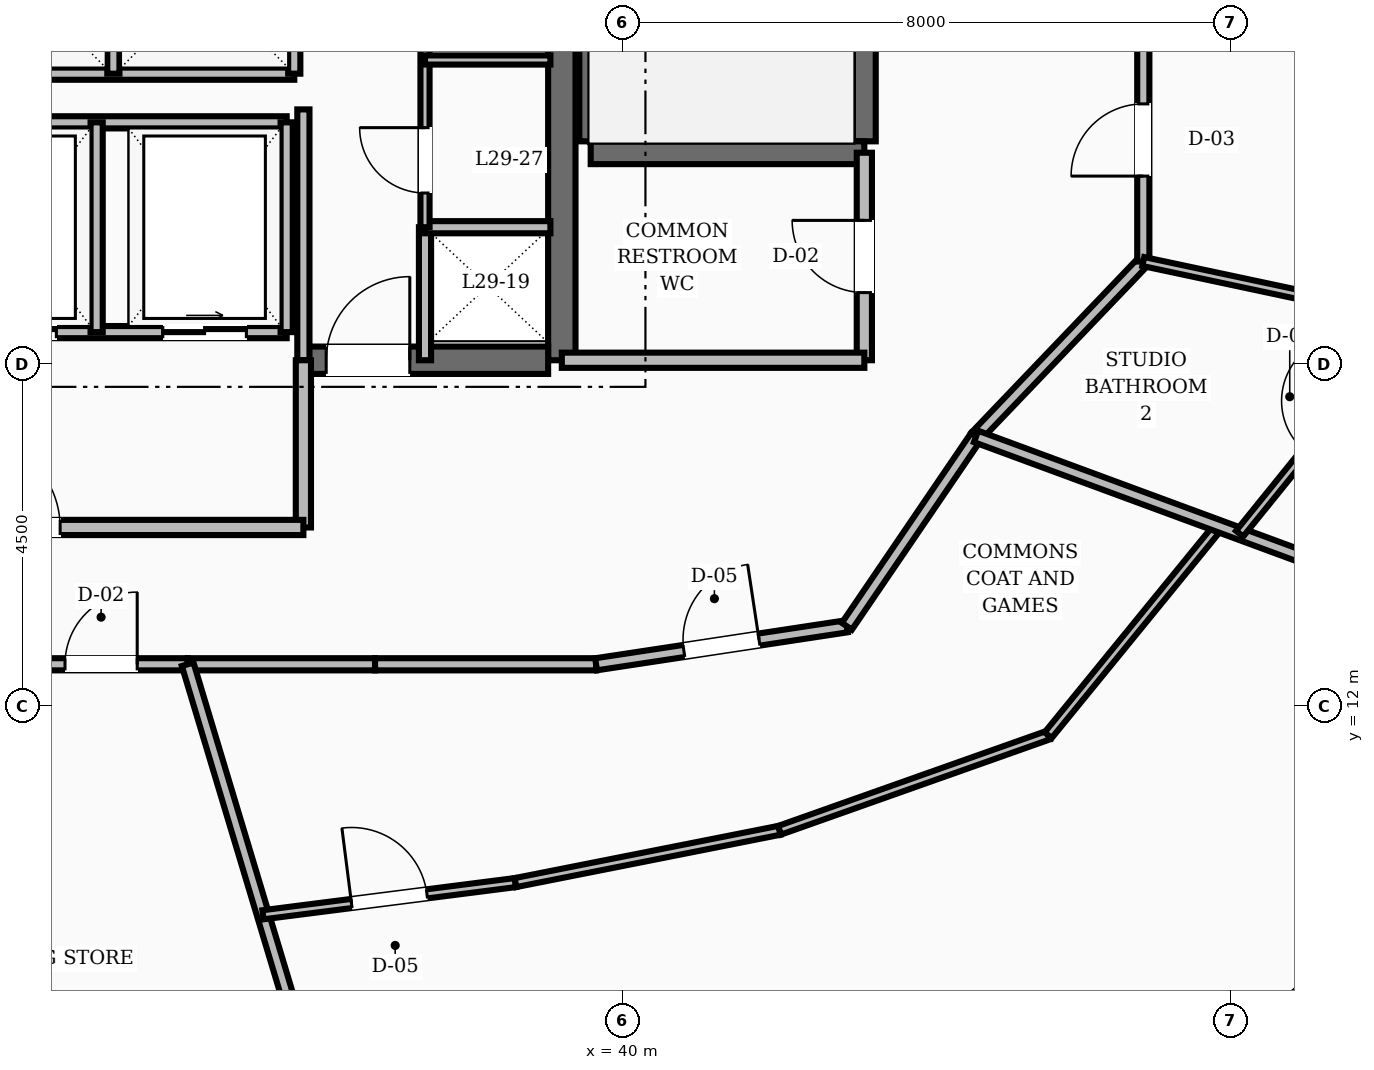
"""IFC4 building model, lengths in metres.
Left out: names, types, materials, properties, quantities, classifications, styles, units other than length and angle.
Written with IfcOpenShell. Run it as: python <this file> out.ifc"""

import sys

from ifc_helpers import new_model, si_unit, direction, frame, frame_2d, origin, place, context, subcontext, project, spatial, rectangle, extrude, element, fill, save


model = new_model("IFC4")
c1 = context("Model", 3, precision=1e-05, world=origin(), true_north=direction((0.0, 1.0)))
c2 = subcontext(c1, "Body", "Model", "MODEL_VIEW")
j1 = project(units=[si_unit("LENGTHUNIT", "METRE"), si_unit("PLANEANGLEUNIT", "RADIAN")], contexts=[c1])
p1 = place(None, origin())
s1 = spatial("IfcSite", under=j1, at=p1, CompositionType="ELEMENT")
p2 = place(p1, origin())
s2 = spatial("IfcBuilding", under=s1, at=p2, CompositionType="ELEMENT")
p3 = place(p2, frame((0.0, 0.0, 117.2)))
s3 = spatial("IfcBuildingStorey", under=s2, at=p3, CompositionType="ELEMENT", Elevation=117.2)
p4 = place(p3, frame((39.2, 16.55, 0.0), z_axis=(0.0, 0.0, 1.0), x_axis=(0.0, 1.0, 0.0)))
e1 = element("IfcWall", 1, at=p4, inside=s3, PredefinedType="SHEAR", context=c2, shape_type="SweptSolid", body=[
    extrude(rectangle(XDim=6.3, YDim=0.36, at=frame_2d((3.15, 0.0))), origin(), (0.0, 0.0, 1.0), 3.6),
])
p5 = place(p3, frame((35.8, 16.55, 0.0), z_axis=(0.0, 0.0, 1.0), x_axis=(1.0, 0.0, 0.0)))
e2 = element("IfcWall", 2, at=p5, inside=s3, PredefinedType="SHEAR", context=c2, shape_type="SweptSolid", body=[
    extrude(rectangle(XDim=3.22, YDim=0.36, at=frame_2d((1.61, 0.0))), origin(), (0.0, 0.0, 1.0), 3.6),
])
p6 = place(p5, frame((0.3, 0.0, 0.0)))
e3 = element("IfcOpeningElement", 3, at=p6, cuts=e2, PredefinedType="OPENING", context=c2, shape_type="SweptSolid", body=[
    extrude(rectangle(XDim=1.1, YDim=2.1, at=frame_2d((0.55, 1.05))), frame((0.0, 0.19, 0.0), z_axis=(0.0, -1.0, 0.0), x_axis=(1.0, 0.0, 0.0)), (0.0, 0.0, 1.0), 0.38),
])
for number, where, z_axis, x_axis in (
    (4, (43.18, 19.43, 0.0), (0.0, 0.0, 1.0), (0.0, 1.0, 0.0)),
    (5, (39.58, 19.43, 0.0), (0.0, 0.0, 1.0), (0.0, 1.0, 0.0)),
):
    element("IfcWall", number, at=place(p3, frame(where, z_axis=z_axis, x_axis=x_axis)), inside=s3, PredefinedType="SHEAR", context=c2, shape_type="SweptSolid", body=[
        extrude(rectangle(XDim=8.74, YDim=0.3, at=frame_2d((4.37, 0.0))), origin(), (0.0, 0.0, 1.0), 3.6),
    ])
p7 = place(p3, frame((39.58, 19.28, 0.0), z_axis=(0.0, 0.0, 1.0), x_axis=(1.0, 0.0, 0.0)))
e6 = element("IfcWall", 6, at=p7, inside=s3, PredefinedType="SHEAR", context=c2, shape_type="SweptSolid", body=[
    extrude(rectangle(XDim=3.6, YDim=0.3, at=frame_2d((1.8, 0.0))), origin(), (0.0, 0.0, 1.0), 3.6),
])
p8 = place(p3, frame((43.18, 16.55, 0.0), z_axis=(0.0, 0.0, 1.0), x_axis=(0.0, 1.0, 0.0)))
e7 = element("IfcWall", 7, at=p8, inside=s3, PredefinedType="SOLIDWALL", context=c2, shape_type="SweptSolid", body=[
    extrude(rectangle(XDim=2.73, YDim=0.2, at=frame_2d((1.365, 0.0))), origin(), (0.0, 0.0, 1.0), 2.8),
])
p9 = place(p8, frame((0.89, 0.0, 0.0)))
e8 = element("IfcOpeningElement", 8, at=p9, cuts=e7, PredefinedType="OPENING", context=c2, shape_type="SweptSolid", body=[
    extrude(rectangle(XDim=0.95, YDim=2.1, at=frame_2d((0.475, 1.05))), frame((0.0, 0.11, 0.0), z_axis=(0.0, -1.0, 0.0), x_axis=(1.0, 0.0, 0.0)), (0.0, 0.0, 1.0), 0.22),
])
p10 = place(p3, frame((39.2, 16.55, 0.0), z_axis=(0.0, 0.0, 1.0), x_axis=(1.0, 0.0, 0.0)))
e9 = element("IfcWall", 9, at=p10, inside=s3, PredefinedType="SOLIDWALL", context=c2, shape_type="SweptSolid", body=[
    extrude(rectangle(XDim=3.98, YDim=0.2, at=frame_2d((1.99, 0.0))), origin(), (0.0, 0.0, 1.0), 2.8),
])
p11 = place(p3, frame((35.8, 16.55, 0.0), z_axis=(0.0, 0.0, 1.0), x_axis=(0.0, 1.0, 0.0)))
e10 = element("IfcWall", 10, at=p11, inside=s3, PredefinedType="SOLIDWALL", context=c2, shape_type="SweptSolid", body=[
    extrude(rectangle(XDim=3.3, YDim=0.16, at=frame_2d((1.65, 0.0))), origin(), (0.0, 0.0, 1.0), 2.8),
])
p12 = place(p3, frame((37.4, 16.55, 0.0), z_axis=(0.0, 0.0, 1.0), x_axis=(0.0, 1.0, 0.0)))
e11 = element("IfcWall", 11, at=p12, inside=s3, PredefinedType="SOLIDWALL", context=c2, shape_type="SweptSolid", body=[
    extrude(rectangle(XDim=1.75, YDim=0.16, at=frame_2d((0.875, 0.0))), origin(), (0.0, 0.0, 1.0), 2.8),
])
p13 = place(p3, frame((35.8, 14.35, 0.0), z_axis=(0.0, 0.0, 1.0), x_axis=(0.0, 1.0, 0.0)))
e12 = element("IfcWall", 12, at=p13, inside=s3, PredefinedType="SOLIDWALL", context=c2, shape_type="SweptSolid", body=[
    extrude(rectangle(XDim=2.2, YDim=0.2, at=frame_2d((1.1, 0.0))), origin(), (0.0, 0.0, 1.0), 2.8),
])
p14 = place(p3, frame((28.2, 14.35, 0.0), z_axis=(0.0, 0.0, 1.0), x_axis=(1.0, 0.0, 0.0)))
e13 = element("IfcWall", 13, at=p14, inside=s3, PredefinedType="SOLIDWALL", context=c2, shape_type="SweptSolid", body=[
    extrude(rectangle(XDim=7.6, YDim=0.2, at=frame_2d((3.8, 0.0))), origin(), (0.0, 0.0, 1.0), 2.8),
])
p15 = place(p14, frame((3.2, 0.0, 0.0)))
e14 = element("IfcOpeningElement", 14, at=p15, cuts=e13, PredefinedType="OPENING", context=c2, shape_type="SweptSolid", body=[
    extrude(rectangle(XDim=1.2, YDim=2.1, at=frame_2d((0.6, 1.05))), frame((0.0, 0.11, 0.0), z_axis=(0.0, -1.0, 0.0), x_axis=(1.0, 0.0, 0.0)), (0.0, 0.0, 1.0), 0.22),
])
p16 = place(p3, frame((30.92, 20.32, 0.0), z_axis=(0.0, 0.0, 1.0), x_axis=(1.0, 0.0, 0.0)))
e15 = element("IfcWall", 15, at=p16, inside=s3, PredefinedType="SOLIDWALL", context=c2, shape_type="SweptSolid", body=[
    extrude(rectangle(XDim=4.76, YDim=0.16, at=frame_2d((2.38, 0.0))), origin(), (0.0, 0.0, 1.0), 2.8),
])
for number, where, z_axis, x_axis in (
    (16, (33.3, 20.32, 0.0), (0.0, 0.0, 1.0), (0.0, 1.0, 0.0)),
    (17, (35.68, 20.32, 0.0), (0.0, 0.0, 1.0), (0.0, 1.0, 0.0)),
):
    element("IfcWall", number, at=place(p3, frame(where, z_axis=z_axis, x_axis=x_axis)), inside=s3, PredefinedType="SOLIDWALL", context=c2, shape_type="SweptSolid", body=[
        extrude(rectangle(XDim=2.36, YDim=0.16, at=frame_2d((1.18, 0.0))), origin(), (0.0, 0.0, 1.0), 2.8),
    ])
p17 = place(p3, frame((28.42, 16.92, 0.0), z_axis=(0.0, 0.0, 1.0), x_axis=(1.0, 0.0, 0.0)))
e18 = element("IfcWall", 18, at=p17, inside=s3, PredefinedType="SOLIDWALL", context=c2, shape_type="SweptSolid", body=[
    extrude(rectangle(XDim=7.16, YDim=0.16, at=frame_2d((3.58, 0.0))), origin(), (0.0, 0.0, 1.0), 2.8),
])
p18 = place(p17, frame((0.53, 0.0, 0.0)))
e19 = element("IfcOpeningElement", 19, at=p18, cuts=e18, PredefinedType="OPENING", context=c2, shape_type="SweptSolid", body=[
    extrude(rectangle(XDim=1.1, YDim=2.15, at=frame_2d((0.55, 1.075))), frame((0.0, 0.09, 0.0), z_axis=(0.0, -1.0, 0.0), x_axis=(1.0, 0.0, 0.0)), (0.0, 0.0, 1.0), 0.18),
])
p19 = place(p17, frame((3.03, 0.0, 0.0)))
e20 = element("IfcOpeningElement", 20, at=p19, cuts=e18, PredefinedType="OPENING", context=c2, shape_type="SweptSolid", body=[
    extrude(rectangle(XDim=1.1, YDim=2.15, at=frame_2d((0.55, 1.075))), frame((0.0, 0.09, 0.0), z_axis=(0.0, -1.0, 0.0), x_axis=(1.0, 0.0, 0.0)), (0.0, 0.0, 1.0), 0.18),
])
p20 = place(p17, frame((5.53, 0.0, 0.0)))
e21 = element("IfcOpeningElement", 21, at=p20, cuts=e18, PredefinedType="OPENING", context=c2, shape_type="SweptSolid", body=[
    extrude(rectangle(XDim=1.1, YDim=2.15, at=frame_2d((0.55, 1.075))), frame((0.0, 0.09, 0.0), z_axis=(0.0, -1.0, 0.0), x_axis=(1.0, 0.0, 0.0)), (0.0, 0.0, 1.0), 0.18),
])
p21 = place(p3, frame((28.42, 19.68, 0.0), z_axis=(0.0, 0.0, 1.0), x_axis=(1.0, 0.0, 0.0)))
e22 = element("IfcWall", 22, at=p21, inside=s3, PredefinedType="SOLIDWALL", context=c2, shape_type="SweptSolid", body=[
    extrude(rectangle(XDim=7.16, YDim=0.16, at=frame_2d((3.58, 0.0))), origin(), (0.0, 0.0, 1.0), 2.8),
])
for number, where, z_axis, x_axis in (
    (23, (33.08, 16.92, 0.0), (0.0, 0.0, 1.0), (0.0, 1.0, 0.0)),
    (24, (35.58, 16.92, 0.0), (0.0, 0.0, 1.0), (0.0, 1.0, 0.0)),
):
    element("IfcWall", number, at=place(p3, frame(where, z_axis=z_axis, x_axis=x_axis)), inside=s3, PredefinedType="SOLIDWALL", context=c2, shape_type="SweptSolid", body=[
        extrude(rectangle(XDim=2.76, YDim=0.16, at=frame_2d((1.38, 0.0))), origin(), (0.0, 0.0, 1.0), 2.8),
    ])
p22 = place(p3, frame((37.4, 18.3, 0.0), z_axis=(0.0, 0.0, 1.0), x_axis=(1.0, 0.0, 0.0)))
e25 = element("IfcWall", 25, at=p22, inside=s3, PredefinedType="SOLIDWALL", context=c2, shape_type="SweptSolid", body=[
    extrude(rectangle(XDim=1.65, YDim=0.16, at=frame_2d((0.825, 0.0))), origin(), (0.0, 0.0, 1.0), 2.8),
])
p23 = place(p3, frame((37.4, 18.3, 0.0), z_axis=(0.0, 0.0, 1.0), x_axis=(0.0, 1.0, 0.0)))
e26 = element("IfcWall", 26, at=p23, inside=s3, PredefinedType="PARTITIONING", context=c2, shape_type="SweptSolid", body=[
    extrude(rectangle(XDim=4.45, YDim=0.12, at=frame_2d((2.225, 0.0))), origin(), (0.0, 0.0, 1.0), 2.8),
])
p24 = place(p23, frame((0.45, 0.0, 0.0)))
e27 = element("IfcOpeningElement", 27, at=p24, cuts=e26, PredefinedType="OPENING", context=c2, shape_type="SweptSolid", body=[
    extrude(rectangle(XDim=0.86, YDim=2.1, at=frame_2d((0.43, 1.05))), frame((0.0, 0.07, 0.0), z_axis=(0.0, -1.0, 0.0), x_axis=(1.0, 0.0, 0.0)), (0.0, 0.0, 1.0), 0.14),
])
p25 = place(p23, frame((2.65, 0.0, 0.0)))
e28 = element("IfcOpeningElement", 28, at=p25, cuts=e26, PredefinedType="OPENING", context=c2, shape_type="SweptSolid", body=[
    extrude(rectangle(XDim=0.86, YDim=2.1, at=frame_2d((0.43, 1.05))), frame((0.0, 0.07, 0.0), z_axis=(0.0, -1.0, 0.0), x_axis=(1.0, 0.0, 0.0)), (0.0, 0.0, 1.0), 0.14),
])
p26 = place(p3, frame((37.4, 20.5, 0.0), z_axis=(0.0, 0.0, 1.0), x_axis=(1.0, 0.0, 0.0)))
e29 = element("IfcWall", 29, at=p26, inside=s3, PredefinedType="PARTITIONING", context=c2, shape_type="SweptSolid", body=[
    extrude(rectangle(XDim=1.65, YDim=0.12, at=frame_2d((0.825, 0.0))), origin(), (0.0, 0.0, 1.0), 2.8),
])
p27 = place(p3, frame((32.0, 12.55, 0.0), z_axis=(0.0, 0.0, 1.0), x_axis=(1.0, 0.0, 0.0)))
e30 = element("IfcWall", 30, at=p27, inside=s3, PredefinedType="SOLIDWALL", context=c2, shape_type="SweptSolid", body=[
    extrude(rectangle(XDim=2.278, YDim=0.16, at=frame_2d((1.139, 0.0))), origin(), (0.0, 0.0, 1.0), 2.8),
])
p28 = place(p27, frame((0.664, 0.0, 0.0)))
e31 = element("IfcOpeningElement", 31, at=p28, cuts=e30, PredefinedType="OPENING", context=c2, shape_type="SweptSolid", body=[
    extrude(rectangle(XDim=0.95, YDim=2.1, at=frame_2d((0.475, 1.05))), frame((0.0, 0.09, 0.0), z_axis=(0.0, -1.0, 0.0), x_axis=(1.0, 0.0, 0.0)), (0.0, 0.0, 1.0), 0.18),
])
p29 = place(p3, frame((34.278, 12.55, 0.0), z_axis=(0.0, 0.0, 1.0), x_axis=(1.0, 0.0, 0.0)))
e32 = element("IfcWall", 32, at=p29, inside=s3, PredefinedType="SOLIDWALL", context=c2, shape_type="SweptSolid", body=[
    extrude(rectangle(XDim=2.465, YDim=0.16, at=frame_2d((1.232, 0.0))), origin(), (0.0, 0.0, 1.0), 2.8),
])
p30 = place(p3, frame((36.743, 12.55, 0.0), z_axis=(0.0, 0.0, 1.0), x_axis=(1.0, 0.0, 0.0)))
e33 = element("IfcWall", 33, at=p30, inside=s3, PredefinedType="SOLIDWALL", context=c2, shape_type="SweptSolid", body=[
    extrude(rectangle(XDim=2.908, YDim=0.16, at=frame_2d((1.454, 0.0))), origin(), (0.0, 0.0, 1.0), 2.8),
])
p31 = place(p3, frame((39.651, 12.55, 0.0), z_axis=(0.0, 0.0, 1.0), x_axis=(0.988710906508, 0.149835721217, 0.0)))
e34 = element("IfcWall", 34, at=p31, inside=s3, PredefinedType="SOLIDWALL", context=c2, shape_type="SweptSolid", body=[
    extrude(rectangle(XDim=3.337, YDim=0.16, at=frame_2d((1.668, 0.0))), origin(), (0.0, 0.0, 1.0), 2.8),
])
p32 = place(p31, frame((1.168, 0.0, 0.0)))
e35 = element("IfcOpeningElement", 35, at=p32, cuts=e34, PredefinedType="OPENING", context=c2, shape_type="SweptSolid", body=[
    extrude(rectangle(XDim=1.0, YDim=2.1, at=frame_2d((0.5, 1.05))), frame((0.0, 0.09, 0.0), z_axis=(0.0, -1.0, 0.0), x_axis=(1.0, 0.0, 0.0)), (0.0, 0.0, 1.0), 0.18),
])
p33 = place(p3, frame((42.95, 13.05, 0.0), z_axis=(0.0, 0.0, 1.0), x_axis=(0.562674669208, 0.826678423955, 0.0)))
e36 = element("IfcWall", 36, at=p33, inside=s3, PredefinedType="SOLIDWALL", context=c2, shape_type="SweptSolid", body=[
    extrude(rectangle(XDim=3.021, YDim=0.16, at=frame_2d((1.511, 0.0))), origin(), (0.0, 0.0, 1.0), 2.8),
])
p34 = place(p3, frame((44.65, 15.548, 0.0), z_axis=(0.0, 0.0, 1.0), x_axis=(0.691055487108, 0.722801711216, 0.0)))
e37 = element("IfcWall", 37, at=p34, inside=s3, PredefinedType="SOLIDWALL", context=c2, shape_type="SweptSolid", body=[
    extrude(rectangle(XDim=3.184, YDim=0.16, at=frame_2d((1.592, 0.0))), origin(), (0.0, 0.0, 1.0), 2.8),
])
p35 = place(p3, frame((46.85, 17.849, 0.0), z_axis=(0.0, 0.0, 1.0), x_axis=(0.0, 1.0, 0.0)))
e38 = element("IfcWall", 38, at=p35, inside=s3, PredefinedType="SOLIDWALL", context=c2, shape_type="SweptSolid", body=[
    extrude(rectangle(XDim=3.197, YDim=0.16, at=frame_2d((1.599, 0.0))), origin(), (0.0, 0.0, 1.0), 2.8),
])
p36 = place(p35, frame((1.124, 0.0, 0.0)))
e39 = element("IfcOpeningElement", 39, at=p36, cuts=e38, PredefinedType="OPENING", context=c2, shape_type="SweptSolid", body=[
    extrude(rectangle(XDim=0.95, YDim=2.1, at=frame_2d((0.475, 1.05))), frame((0.0, 0.09, 0.0), z_axis=(0.0, -1.0, 0.0), x_axis=(1.0, 0.0, 0.0)), (0.0, 0.0, 1.0), 0.18),
])
p37 = place(p3, frame((34.278, 12.55, 0.0), z_axis=(0.0, 0.0, 1.0), x_axis=(0.287936282095, -0.957649569234, 0.0)))
e40 = element("IfcWall", 40, at=p37, inside=s3, PredefinedType="SOLIDWALL", context=c2, shape_type="SweptSolid", body=[
    extrude(rectangle(XDim=9.782, YDim=0.16, at=frame_2d((4.891, 0.0))), origin(), (0.0, 0.0, 1.0), 2.8),
])
p38 = place(p3, frame((35.268, 9.254, 0.0), z_axis=(0.0, 0.0, 1.0), x_axis=(0.99195835068, 0.12656472856, 0.0)))
e41 = element("IfcWall", 41, at=p38, inside=s3, PredefinedType="PARTITIONING", context=c2, shape_type="SweptSolid", body=[
    extrude(rectangle(XDim=3.349, YDim=0.12, at=frame_2d((1.674, 0.0))), origin(), (0.0, 0.0, 1.0), 2.8),
])
p39 = place(p38, frame((1.174, 0.0, 0.0)))
e42 = element("IfcOpeningElement", 42, at=p39, cuts=e41, PredefinedType="OPENING", context=c2, shape_type="SweptSolid", body=[
    extrude(rectangle(XDim=1.0, YDim=2.1, at=frame_2d((0.5, 1.05))), frame((0.0, 0.07, 0.0), z_axis=(0.0, -1.0, 0.0), x_axis=(1.0, 0.0, 0.0)), (0.0, 0.0, 1.0), 0.14),
])
p40 = place(p3, frame((38.59, 9.678, 0.0), z_axis=(0.0, 0.0, 1.0), x_axis=(0.980955311434, 0.19423356293, 0.0)))
e43 = element("IfcWall", 43, at=p40, inside=s3, PredefinedType="PARTITIONING", context=c2, shape_type="SweptSolid", body=[
    extrude(rectangle(XDim=3.542, YDim=0.12, at=frame_2d((1.771, 0.0))), origin(), (0.0, 0.0, 1.0), 2.8),
])
p41 = place(p3, frame((42.065, 10.366, 0.0), z_axis=(0.0, 0.0, 1.0), x_axis=(0.942672477538, 0.333719343299, 0.0)))
e44 = element("IfcWall", 44, at=p41, inside=s3, PredefinedType="PARTITIONING", context=c2, shape_type="SweptSolid", body=[
    extrude(rectangle(XDim=3.749, YDim=0.12, at=frame_2d((1.874, 0.0))), origin(), (0.0, 0.0, 1.0), 2.8),
])
p42 = place(p3, frame((45.598, 11.617, 0.0), z_axis=(0.0, 0.0, 1.0), x_axis=(0.632136503623, 0.774857045388, 0.0)))
e45 = element("IfcWall", 45, at=p42, inside=s3, PredefinedType="PARTITIONING", context=c2, shape_type="SweptSolid", body=[
    extrude(rectangle(XDim=3.551, YDim=0.12, at=frame_2d((1.776, 0.0))), origin(), (0.0, 0.0, 1.0), 2.8),
])
p43 = place(p3, frame((44.65, 15.548, 0.0), z_axis=(0.0, 0.0, 1.0), x_axis=(0.938144779107, -0.34624322872, 0.0)))
e46 = element("IfcWall", 46, at=p43, inside=s3, PredefinedType="SOLIDWALL", context=c2, shape_type="SweptSolid", body=[
    extrude(rectangle(XDim=9.675, YDim=0.16, at=frame_2d((4.837, 0.0))), origin(), (0.0, 0.0, 1.0), 2.8),
])
p44 = place(p3, frame((48.117, 14.268, 0.0), z_axis=(0.0, 0.0, 1.0), x_axis=(0.628695338922, 0.777651702768, 0.0)))
e47 = element("IfcWall", 47, at=p44, inside=s3, PredefinedType="PARTITIONING", context=c2, shape_type="SweptSolid", body=[
    extrude(rectangle(XDim=3.632, YDim=0.12, at=frame_2d((1.816, 0.0))), origin(), (0.0, 0.0, 1.0), 2.8),
])
p45 = place(p44, frame((1.386, 0.0, 0.0)))
e48 = element("IfcOpeningElement", 48, at=p45, cuts=e47, PredefinedType="OPENING", context=c2, shape_type="SweptSolid", body=[
    extrude(rectangle(XDim=0.86, YDim=2.1, at=frame_2d((0.43, 1.05))), frame((0.0, 0.07, 0.0), z_axis=(0.0, -1.0, 0.0), x_axis=(1.0, 0.0, 0.0)), (0.0, 0.0, 1.0), 0.14),
])
p46 = place(p3, frame((46.85, 17.849, 0.0), z_axis=(0.0, 0.0, 1.0), x_axis=(0.978051717374, -0.208362276195, 0.0)))
e49 = element("IfcWall", 49, at=p46, inside=s3, PredefinedType="PARTITIONING", context=c2, shape_type="SweptSolid", body=[
    extrude(rectangle(XDim=3.63, YDim=0.12, at=frame_2d((1.815, 0.0))), origin(), (0.0, 0.0, 1.0), 2.8),
])
p47 = place(p3, frame((46.85, 21.046, 0.0), z_axis=(0.0, 0.0, 1.0), x_axis=(0.993954333891, -0.109794271889, 0.0)))
e50 = element("IfcWall", 50, at=p47, inside=s3, PredefinedType="SOLIDWALL", context=c2, shape_type="SweptSolid", body=[
    extrude(rectangle(XDim=10.849, YDim=0.16, at=frame_2d((5.425, 0.0))), origin(), (0.0, 0.0, 1.0), 2.8),
])
p48 = place(p9, origin())
e51 = element("IfcDoor", 51, at=p48, inside=s3, OperationType="SINGLE_SWING_RIGHT", PredefinedType="DOOR", context=c2, shape_type="SweptSolid", body=[
    extrude(rectangle(XDim=0.95, YDim=2.1, at=frame_2d((0.475, 1.05))), frame((0.0, 0.025, 0.0), z_axis=(0.0, -1.0, 0.0), x_axis=(1.0, 0.0, 0.0)), (0.0, 0.0, 1.0), 0.05),
])
fill(e8, e51)
p49 = place(p6, origin())
e52 = element("IfcDoor", 52, at=p49, inside=s3, OperationType="SINGLE_SWING_RIGHT", PredefinedType="DOOR", context=c2, shape_type="SweptSolid", body=[
    extrude(rectangle(XDim=1.1, YDim=2.1, at=frame_2d((0.55, 1.05))), frame((0.0, 0.025, 0.0), z_axis=(0.0, -1.0, 0.0), x_axis=(1.0, 0.0, 0.0)), (0.0, 0.0, 1.0), 0.05),
])
fill(e3, e52)
p50 = place(p15, origin())
e53 = element("IfcDoor", 53, at=p50, inside=s3, OperationType="SINGLE_SWING_LEFT", PredefinedType="DOOR", context=c2, shape_type="SweptSolid", body=[
    extrude(rectangle(XDim=1.2, YDim=2.1, at=frame_2d((0.6, 1.05))), frame((0.0, 0.025, 0.0), z_axis=(0.0, -1.0, 0.0), x_axis=(1.0, 0.0, 0.0)), (0.0, 0.0, 1.0), 0.05),
])
fill(e14, e53)
p51 = place(p19, origin())
e54 = element("IfcDoor", 54, at=p51, inside=s3, OperationType="SLIDING_TO_RIGHT", PredefinedType="DOOR", context=c2, shape_type="SweptSolid", body=[
    extrude(rectangle(XDim=1.1, YDim=2.15, at=frame_2d((0.55, 1.075))), frame((0.0, 0.025, 0.0), z_axis=(0.0, -1.0, 0.0), x_axis=(1.0, 0.0, 0.0)), (0.0, 0.0, 1.0), 0.05),
])
fill(e20, e54)
p52 = place(p20, origin())
e55 = element("IfcDoor", 55, at=p52, inside=s3, OperationType="SLIDING_TO_RIGHT", PredefinedType="DOOR", context=c2, shape_type="SweptSolid", body=[
    extrude(rectangle(XDim=1.1, YDim=2.15, at=frame_2d((0.55, 1.075))), frame((0.0, 0.025, 0.0), z_axis=(0.0, -1.0, 0.0), x_axis=(1.0, 0.0, 0.0)), (0.0, 0.0, 1.0), 0.05),
])
fill(e21, e55)
p53 = place(p24, origin())
e56 = element("IfcDoor", 56, at=p53, inside=s3, OperationType="SINGLE_SWING_RIGHT", PredefinedType="DOOR", context=c2, shape_type="SweptSolid", body=[
    extrude(rectangle(XDim=0.86, YDim=2.1, at=frame_2d((0.43, 1.05))), frame((0.0, 0.025, 0.0), z_axis=(0.0, -1.0, 0.0), x_axis=(1.0, 0.0, 0.0)), (0.0, 0.0, 1.0), 0.05),
])
fill(e27, e56)
p54 = place(p32, origin())
e57 = element("IfcDoor", 57, at=p54, inside=s3, OperationType="SINGLE_SWING_RIGHT", PredefinedType="DOOR", context=c2, shape_type="SweptSolid", body=[
    extrude(rectangle(XDim=1.0, YDim=2.1, at=frame_2d((0.5, 1.05))), frame((0.0, 0.025, 0.0), z_axis=(0.0, -1.0, 0.0), x_axis=(1.0, 0.0, 0.0)), (0.0, 0.0, 1.0), 0.05),
])
fill(e35, e57)
p55 = place(p39, origin())
e58 = element("IfcDoor", 58, at=p55, inside=s3, OperationType="SINGLE_SWING_LEFT", PredefinedType="DOOR", context=c2, shape_type="SweptSolid", body=[
    extrude(rectangle(XDim=1.0, YDim=2.1, at=frame_2d((0.5, 1.05))), frame((0.0, 0.025, 0.0), z_axis=(0.0, -1.0, 0.0), x_axis=(1.0, 0.0, 0.0)), (0.0, 0.0, 1.0), 0.05),
])
fill(e42, e58)
p56 = place(p36, origin())
e59 = element("IfcDoor", 59, at=p56, inside=s3, OperationType="SINGLE_SWING_LEFT", PredefinedType="DOOR", context=c2, shape_type="SweptSolid", body=[
    extrude(rectangle(XDim=0.95, YDim=2.1, at=frame_2d((0.475, 1.05))), frame((0.0, 0.025, 0.0), z_axis=(0.0, -1.0, 0.0), x_axis=(1.0, 0.0, 0.0)), (0.0, 0.0, 1.0), 0.05),
])
fill(e39, e59)
p57 = place(p28, origin())
e60 = element("IfcDoor", 60, at=p57, inside=s3, OperationType="SINGLE_SWING_RIGHT", PredefinedType="DOOR", context=c2, shape_type="SweptSolid", body=[
    extrude(rectangle(XDim=0.95, YDim=2.1, at=frame_2d((0.475, 1.05))), frame((0.0, 0.025, 0.0), z_axis=(0.0, -1.0, 0.0), x_axis=(1.0, 0.0, 0.0)), (0.0, 0.0, 1.0), 0.05),
])
fill(e31, e60)
save(model, sys.argv[1])
